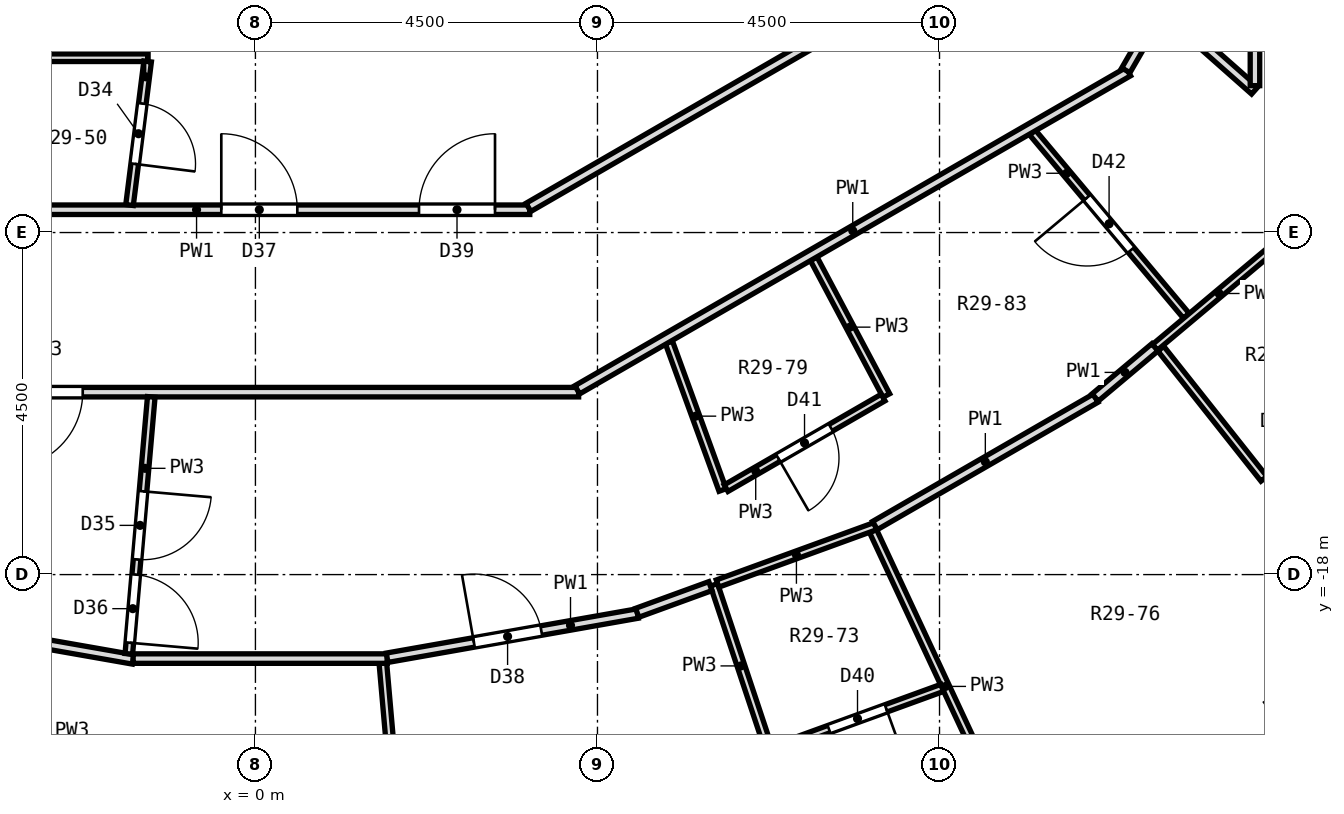
"""IFC4 building model, lengths in metres.
Left out: names, types, materials, properties, quantities, classifications, styles, units other than length and angle.
Written with IfcOpenShell. Run it as: python <this file> out.ifc"""

import sys

from ifc_helpers import new_model, si_unit, direction, frame, frame_2d, origin, place, context, subcontext, project, spatial, rectangle, extrude, element, fill, save


model = new_model("IFC4")
c1 = context("Model", 3, precision=1e-05, world=origin(), true_north=direction((0.0, 1.0)))
c2 = subcontext(c1, "Body", "Model", "MODEL_VIEW")
j1 = project(units=[si_unit("LENGTHUNIT", "METRE"), si_unit("PLANEANGLEUNIT", "RADIAN")], contexts=[c1])
p1 = place(None, origin())
s1 = spatial("IfcSite", under=j1, at=p1, CompositionType="ELEMENT")
p2 = place(p1, origin())
s2 = spatial("IfcBuilding", under=s1, at=p2, CompositionType="ELEMENT")
p3 = place(p2, frame((0.0, 0.0, 200.4)))
s3 = spatial("IfcBuildingStorey", under=s2, at=p3, CompositionType="ELEMENT", Elevation=200.4)
p4 = place(p3, frame((1.677, -19.167, 0.0), z_axis=(0.0, 0.0, 1.0), x_axis=(0.087521667832, -0.996162616072, 0.0)))
e1 = element("IfcWall", 1, at=p4, inside=s3, PredefinedType="PARTITIONING", context=c2, shape_type="SweptSolid", body=[
    extrude(rectangle(XDim=4.5, YDim=0.1, at=frame_2d((2.25, 0.0))), origin(), (0.0, 0.0, 1.0), 2.85),
])
p5 = place(p3, frame((6.033, -18.135, 0.0), z_axis=(0.0, 0.0, 1.0), x_axis=(0.316032342538, -0.948748416847, 0.0)))
e2 = element("IfcWall", 2, at=p5, inside=s3, PredefinedType="PARTITIONING", context=c2, shape_type="SweptSolid", body=[
    extrude(rectangle(XDim=2.249, YDim=0.1, at=frame_2d((1.125, 0.0))), origin(), (0.0, 0.0, 1.0), 2.85),
])
p6 = place(p3, frame((5.439, -14.944, 0.0), z_axis=(0.0, 0.0, 1.0), x_axis=(0.341828386263, -0.939762392493, 0.0)))
e3 = element("IfcWall", 3, at=p6, inside=s3, PredefinedType="PARTITIONING", context=c2, shape_type="SweptSolid", body=[
    extrude(rectangle(XDim=2.068, YDim=0.1, at=frame_2d((1.034, 0.0))), origin(), (0.0, 0.0, 1.0), 2.85),
])
p7 = place(p3, frame((8.125, -17.427, 0.0), z_axis=(0.0, 0.0, 1.0), x_axis=(0.422852881861, -0.906198344901, 0.0)))
e4 = element("IfcWall", 4, at=p7, inside=s3, PredefinedType="PARTITIONING", context=c2, shape_type="SweptSolid", body=[
    extrude(rectangle(XDim=4.512, YDim=0.1, at=frame_2d((2.256, 0.0))), origin(), (0.0, 0.0, 1.0), 2.85),
])
p8 = place(p3, frame((7.345, -13.845, 0.0), z_axis=(0.0, 0.0, 1.0), x_axis=(0.46899451783, -0.883201076905, 0.0)))
e5 = element("IfcWall", 5, at=p8, inside=s3, PredefinedType="PARTITIONING", context=c2, shape_type="SweptSolid", body=[
    extrude(rectangle(XDim=2.036, YDim=0.1, at=frame_2d((1.018, 0.0))), origin(), (0.0, 0.0, 1.0), 2.85),
])
p9 = place(p3, frame((11.912, -15.028, 0.0), z_axis=(0.0, 0.0, 1.0), x_axis=(0.621158069359, -0.783685302191, 0.0)))
e6 = element("IfcWall", 6, at=p9, inside=s3, PredefinedType="PARTITIONING", context=c2, shape_type="SweptSolid", body=[
    extrude(rectangle(XDim=2.184, YDim=0.1, at=frame_2d((1.092, 0.0))), origin(), (0.0, 0.0, 1.0), 2.85),
])
p10 = place(p3, frame((10.223, -12.184, 0.0), z_axis=(0.0, 0.0, 1.0), x_axis=(0.642811941649, -0.766024025519, 0.0)))
e7 = element("IfcWall", 7, at=p10, inside=s3, PredefinedType="PARTITIONING", context=c2, shape_type="SweptSolid", body=[
    extrude(rectangle(XDim=3.148, YDim=0.1, at=frame_2d((1.574, 0.0))), origin(), (0.0, 0.0, 1.0), 2.85),
])
p11 = place(p10, frame((1.118, 0.0, 0.0)))
e8 = element("IfcOpeningElement", 8, at=p11, cuts=e7, PredefinedType="OPENING", context=c2, shape_type="SweptSolid", body=[
    extrude(rectangle(XDim=0.9, YDim=2.1, at=frame_2d((0.45, 1.05))), frame((0.0, 0.062, 0.0), z_axis=(0.0, -1.0, 0.0), x_axis=(1.0, 0.0, 0.0)), (0.0, 0.0, 1.0), 0.124),
])
p12 = place(p3, frame((6.418, -5.682, 0.0), z_axis=(0.0, 0.0, 1.0), x_axis=(0.749233096006, -0.662306400278, 0.0)))
e9 = element("IfcWall", 9, at=p12, inside=s3, PredefinedType="PARTITIONING", context=c2, shape_type="SweptSolid", body=[
    extrude(rectangle(XDim=8.982, YDim=0.125, at=frame_2d((4.491, 0.0))), origin(), (0.0, 0.0, 1.0), 2.85),
])
p13 = place(p3, frame((-2.855, -18.897, 0.0), z_axis=(0.0, 0.0, 1.0), x_axis=(0.984944347712, -0.17287172097, 0.0)))
e10 = element("IfcWall", 10, at=p13, inside=s3, PredefinedType="PARTITIONING", context=c2, shape_type="SweptSolid", body=[
    extrude(rectangle(XDim=1.265, YDim=0.125, at=frame_2d((0.633, 0.0))), origin(), (0.0, 0.0, 1.0), 2.85),
])
p14 = place(p3, frame((-1.608, -19.105, 0.0), z_axis=(0.0, 0.0, 1.0), x_axis=(1.0, 0.0, 0.0)))
e11 = element("IfcWall", 11, at=p14, inside=s3, PredefinedType="PARTITIONING", context=c2, shape_type="SweptSolid", body=[
    extrude(rectangle(XDim=3.343, YDim=0.125, at=frame_2d((1.671, 0.0))), origin(), (0.0, 0.0, 1.0), 2.85),
])
p15 = place(p3, frame((-4.116, -15.6, 0.0), z_axis=(0.0, 0.0, 1.0), x_axis=(1.0, 0.0, 0.0)))
e12 = element("IfcWall", 12, at=p15, inside=s3, PredefinedType="PARTITIONING", context=c2, shape_type="SweptSolid", body=[
    extrude(rectangle(XDim=8.369, YDim=0.125, at=frame_2d((4.184, 0.0))), origin(), (0.0, 0.0, 1.0), 2.85),
])
p16 = place(p15, frame((0.844, 0.0, 0.0)))
e13 = element("IfcOpeningElement", 13, at=p16, cuts=e12, PredefinedType="OPENING", context=c2, shape_type="SweptSolid", body=[
    extrude(rectangle(XDim=1.0, YDim=2.1, at=frame_2d((0.5, 1.05))), frame((0.0, 0.074, 0.0), z_axis=(0.0, -1.0, 0.0), x_axis=(1.0, 0.0, 0.0)), (0.0, 0.0, 1.0), 0.149),
])
p17 = place(p3, frame((-3.475, -13.2, 0.0), z_axis=(0.0, 0.0, 1.0), x_axis=(1.0, 0.0, 0.0)))
e14 = element("IfcWall", 14, at=p17, inside=s3, PredefinedType="PARTITIONING", context=c2, shape_type="SweptSolid", body=[
    extrude(rectangle(XDim=7.084, YDim=0.125, at=frame_2d((3.542, 0.0))), origin(), (0.0, 0.0, 1.0), 2.85),
])
p18 = place(p17, frame((3.025, 0.0, 0.0)))
e15 = element("IfcOpeningElement", 15, at=p18, cuts=e14, PredefinedType="OPENING", context=c2, shape_type="SweptSolid", body=[
    extrude(rectangle(XDim=1.0, YDim=2.1, at=frame_2d((0.5, 1.05))), frame((0.0, 0.074, 0.0), z_axis=(0.0, -1.0, 0.0), x_axis=(1.0, 0.0, 0.0)), (0.0, 0.0, 1.0), 0.149),
])
p19 = place(p17, frame((5.626, 0.0, 0.0)))
e16 = element("IfcOpeningElement", 16, at=p19, cuts=e14, PredefinedType="OPENING", context=c2, shape_type="SweptSolid", body=[
    extrude(rectangle(XDim=1.0, YDim=2.1, at=frame_2d((0.5, 1.05))), frame((0.0, 0.074, 0.0), z_axis=(0.0, -1.0, 0.0), x_axis=(1.0, 0.0, 0.0)), (0.0, 0.0, 1.0), 0.149),
])
p20 = place(p3, frame((-2.926, -11.2, 0.0), z_axis=(0.0, 0.0, 1.0), x_axis=(1.0, 0.0, 0.0)))
e17 = element("IfcWall", 17, at=p20, inside=s3, PredefinedType="PARTITIONING", context=c2, shape_type="SweptSolid", body=[
    extrude(rectangle(XDim=1.514, YDim=0.1, at=frame_2d((0.757, 0.0))), origin(), (0.0, 0.0, 1.0), 2.85),
])
p21 = place(p3, frame((1.732, -19.094, 0.0), z_axis=(0.0, 0.0, 1.0), x_axis=(0.984782824009, 0.173789497774, 0.0)))
e18 = element("IfcWall", 18, at=p21, inside=s3, PredefinedType="PARTITIONING", context=c2, shape_type="SweptSolid", body=[
    extrude(rectangle(XDim=3.345, YDim=0.125, at=frame_2d((1.672, 0.0))), origin(), (0.0, 0.0, 1.0), 2.85),
])
p22 = place(p21, frame((1.159, 0.0, 0.0)))
e19 = element("IfcOpeningElement", 19, at=p22, cuts=e18, PredefinedType="OPENING", context=c2, shape_type="SweptSolid", body=[
    extrude(rectangle(XDim=0.9, YDim=2.1, at=frame_2d((0.45, 1.05))), frame((0.0, 0.074, 0.0), z_axis=(0.0, -1.0, 0.0), x_axis=(1.0, 0.0, 0.0)), (0.0, 0.0, 1.0), 0.149),
])
p23 = place(p3, frame((6.807, -20.301, 0.0), z_axis=(0.0, 0.0, 1.0), x_axis=(0.939763340539, 0.341825779863, 0.0)))
e20 = element("IfcWall", 20, at=p23, inside=s3, PredefinedType="PARTITIONING", context=c2, shape_type="SweptSolid", body=[
    extrude(rectangle(XDim=2.37, YDim=0.1, at=frame_2d((1.185, 0.0))), origin(), (0.0, 0.0, 1.0), 2.85),
])
p24 = place(p23, frame((0.785, 0.0, 0.0)))
e21 = element("IfcOpeningElement", 21, at=p24, cuts=e20, PredefinedType="OPENING", context=c2, shape_type="SweptSolid", body=[
    extrude(rectangle(XDim=0.8, YDim=2.1, at=frame_2d((0.4, 1.05))), frame((0.0, 0.062, 0.0), z_axis=(0.0, -1.0, 0.0), x_axis=(1.0, 0.0, 0.0)), (0.0, 0.0, 1.0), 0.124),
])
p25 = place(p3, frame((6.08, -18.118, 0.0), z_axis=(0.0, 0.0, 1.0), x_axis=(0.939706230865, 0.341982747625, 0.0)))
e22 = element("IfcWall", 22, at=p25, inside=s3, PredefinedType="PARTITIONING", context=c2, shape_type="SweptSolid", body=[
    extrude(rectangle(XDim=2.208, YDim=0.1, at=frame_2d((1.104, 0.0))), origin(), (0.0, 0.0, 1.0), 2.85),
])
p26 = place(p3, frame((5.023, -18.503, 0.0), z_axis=(0.0, 0.0, 1.0), x_axis=(0.939605522223, 0.34225934992, 0.0)))
e23 = element("IfcWall", 23, at=p26, inside=s3, PredefinedType="PARTITIONING", context=c2, shape_type="SweptSolid", body=[
    extrude(rectangle(XDim=1.025, YDim=0.125, at=frame_2d((0.513, 0.0))), origin(), (0.0, 0.0, 1.0), 2.85),
])
p27 = place(p3, frame((8.15, -17.355, 0.0), z_axis=(0.0, 0.0, 1.0), x_axis=(0.86608012654, 0.499905205426, 0.0)))
e24 = element("IfcWall", 24, at=p27, inside=s3, PredefinedType="PARTITIONING", context=c2, shape_type="SweptSolid", body=[
    extrude(rectangle(XDim=3.354, YDim=0.125, at=frame_2d((1.677, 0.0))), origin(), (0.0, 0.0, 1.0), 2.85),
])
p28 = place(p3, frame((6.192, -16.863, 0.0), z_axis=(0.0, 0.0, 1.0), x_axis=(0.866112296403, 0.49984946736, 0.0)))
e25 = element("IfcWall", 25, at=p28, inside=s3, PredefinedType="PARTITIONING", context=c2, shape_type="SweptSolid", body=[
    extrude(rectangle(XDim=2.385, YDim=0.1, at=frame_2d((1.192, 0.0))), origin(), (0.0, 0.0, 1.0), 2.85),
])
p29 = place(p28, frame((0.792, 0.0, 0.0)))
e26 = element("IfcOpeningElement", 26, at=p29, cuts=e25, PredefinedType="OPENING", context=c2, shape_type="SweptSolid", body=[
    extrude(rectangle(XDim=0.8, YDim=2.1, at=frame_2d((0.4, 1.05))), frame((0.0, 0.062, 0.0), z_axis=(0.0, -1.0, 0.0), x_axis=(1.0, 0.0, 0.0)), (0.0, 0.0, 1.0), 0.124),
])
p30 = place(p3, frame((4.234, -15.569, 0.0), z_axis=(0.0, 0.0, 1.0), x_axis=(0.866024799292, 0.50000104701, 0.0)))
e27 = element("IfcWall", 27, at=p30, inside=s3, PredefinedType="PARTITIONING", context=c2, shape_type="SweptSolid", body=[
    extrude(rectangle(XDim=8.37, YDim=0.125, at=frame_2d((4.185, 0.0))), origin(), (0.0, 0.0, 1.0), 2.85),
])
p31 = place(p3, frame((3.591, -13.169, 0.0), z_axis=(0.0, 0.0, 1.0), x_axis=(0.866023753919, 0.50000285764, 0.0)))
e28 = element("IfcWall", 28, at=p31, inside=s3, PredefinedType="PARTITIONING", context=c2, shape_type="SweptSolid", body=[
    extrude(rectangle(XDim=6.959, YDim=0.125, at=frame_2d((3.479, 0.0))), origin(), (0.0, 0.0, 1.0), 2.85),
])
p32 = place(p3, frame((11.834, -15.01, 0.0), z_axis=(0.0, 0.0, 1.0), x_axis=(0.766038513467, 0.642794676305, 0.0)))
e29 = element("IfcWall", 29, at=p32, inside=s3, PredefinedType="PARTITIONING", context=c2, shape_type="SweptSolid", body=[
    extrude(rectangle(XDim=2.205, YDim=0.1, at=frame_2d((1.103, 0.0))), origin(), (0.0, 0.0, 1.0), 2.85),
])
p33 = place(p3, frame((11.048, -15.67, 0.0), z_axis=(0.0, 0.0, 1.0), x_axis=(0.765934498954, 0.642918613288, 0.0)))
e30 = element("IfcWall", 30, at=p33, inside=s3, PredefinedType="PARTITIONING", context=c2, shape_type="SweptSolid", body=[
    extrude(rectangle(XDim=1.026, YDim=0.125, at=frame_2d((0.513, 0.0))), origin(), (0.0, 0.0, 1.0), 2.85),
])
p34 = place(p3, frame((11.451, -11.366, 0.0), z_axis=(0.0, 0.0, 1.0), x_axis=(0.500018690203, 0.866014612722, 0.0)))
e31 = element("IfcWall", 31, at=p34, inside=s3, PredefinedType="PARTITIONING", context=c2, shape_type="SweptSolid", body=[
    extrude(rectangle(XDim=0.88, YDim=0.125, at=frame_2d((0.44, 0.0))), origin(), (0.0, 0.0, 1.0), 2.85),
])
p35 = place(p3, frame((-3.521, -13.14, 0.0), z_axis=(0.0, 0.0, 1.0), x_axis=(0.258863724951, 0.965913853252, 0.0)))
e32 = element("IfcWall", 32, at=p35, inside=s3, PredefinedType="PARTITIONING", context=c2, shape_type="SweptSolid", body=[
    extrude(rectangle(XDim=4.111, YDim=0.15, at=frame_2d((2.056, 0.0))), origin(), (0.0, 0.0, 1.0), 2.85),
])
p36 = place(p3, frame((-1.656, -13.138, 0.0), z_axis=(0.0, 0.0, 1.0), x_axis=(0.125060808232, 0.992149078639, 0.0)))
e33 = element("IfcWall", 33, at=p36, inside=s3, PredefinedType="PARTITIONING", context=c2, shape_type="SweptSolid", body=[
    extrude(rectangle(XDim=1.903, YDim=0.1, at=frame_2d((0.952, 0.0))), origin(), (0.0, 0.0, 1.0), 2.85),
])
p37 = place(p36, frame((0.545, 0.0, 0.0)))
e34 = element("IfcOpeningElement", 34, at=p37, cuts=e33, PredefinedType="OPENING", context=c2, shape_type="SweptSolid", body=[
    extrude(rectangle(XDim=0.8, YDim=2.1, at=frame_2d((0.4, 1.05))), frame((0.0, 0.062, 0.0), z_axis=(0.0, -1.0, 0.0), x_axis=(1.0, 0.0, 0.0)), (0.0, 0.0, 1.0), 0.124),
])
p38 = place(p3, frame((-1.666, -19.043, 0.0), z_axis=(0.0, 0.0, 1.0), x_axis=(0.086986657325, 0.99620947669, 0.0)))
e35 = element("IfcWall", 35, at=p38, inside=s3, PredefinedType="PARTITIONING", context=c2, shape_type="SweptSolid", body=[
    extrude(rectangle(XDim=3.393, YDim=0.1, at=frame_2d((1.697, 0.0))), origin(), (0.0, 0.0, 1.0), 2.85),
])
p39 = place(p38, frame((1.247, 0.0, 0.0)))
e36 = element("IfcOpeningElement", 36, at=p39, cuts=e35, PredefinedType="OPENING", context=c2, shape_type="SweptSolid", body=[
    extrude(rectangle(XDim=0.9, YDim=2.1, at=frame_2d((0.45, 1.05))), frame((0.0, 0.062, 0.0), z_axis=(0.0, -1.0, 0.0), x_axis=(1.0, 0.0, 0.0)), (0.0, 0.0, 1.0), 0.124),
])
p40 = place(p38, frame((0.147, 0.0, 0.0)))
e37 = element("IfcOpeningElement", 37, at=p40, cuts=e35, PredefinedType="OPENING", context=c2, shape_type="SweptSolid", body=[
    extrude(rectangle(XDim=0.9, YDim=2.1, at=frame_2d((0.45, 1.05))), frame((0.0, 0.062, 0.0), z_axis=(0.0, -1.0, 0.0), x_axis=(1.0, 0.0, 0.0)), (0.0, 0.0, 1.0), 0.124),
])
p41 = place(p3, frame((13.15, -11.567, 0.0), z_axis=(0.0, 0.0, 1.0), x_axis=(0.0, 1.0, 0.0)))
e38 = element("IfcWall", 38, at=p41, inside=s3, PredefinedType="PARTITIONING", context=c2, shape_type="SweptSolid", body=[
    extrude(rectangle(XDim=2.216, YDim=0.125, at=frame_2d((1.108, 0.0))), origin(), (0.0, 0.0, 1.0), 2.85),
])
p42 = place(p41, frame((1.127, 0.0, 0.0)))
e39 = element("IfcOpeningElement", 39, at=p42, cuts=e38, PredefinedType="OPENING", context=c2, shape_type="SweptSolid", body=[
    extrude(rectangle(XDim=0.9, YDim=2.1, at=frame_2d((0.45, 1.05))), frame((0.0, 0.074, 0.0), z_axis=(0.0, -1.0, 0.0), x_axis=(1.0, 0.0, 0.0)), (0.0, 0.0, 1.0), 0.149),
])
p43 = place(p16, frame((1.0, 0.0, 0.0), z_axis=(0.0, 0.0, 1.0), x_axis=(-1.0, 0.0, 0.0)))
e40 = element("IfcDoor", 40, at=p43, inside=s3, OperationType="SINGLE_SWING_RIGHT", PredefinedType="DOOR", context=c2, shape_type="SweptSolid", body=[
    extrude(rectangle(XDim=1.0, YDim=2.1, at=frame_2d((0.5, 1.05))), frame((0.0, 0.025, 0.0), z_axis=(0.0, -1.0, 0.0), x_axis=(1.0, 0.0, 0.0)), (0.0, 0.0, 1.0), 0.05),
])
fill(e13, e40)
p44 = place(p37, frame((0.8, 0.0, 0.0), z_axis=(0.0, 0.0, 1.0), x_axis=(-1.0, 0.0, 0.0)))
e41 = element("IfcDoor", 41, at=p44, inside=s3, OperationType="SINGLE_SWING_RIGHT", PredefinedType="DOOR", context=c2, shape_type="SweptSolid", body=[
    extrude(rectangle(XDim=0.8, YDim=2.1, at=frame_2d((0.4, 1.05))), frame((0.0, 0.025, 0.0), z_axis=(0.0, -1.0, 0.0), x_axis=(1.0, 0.0, 0.0)), (0.0, 0.0, 1.0), 0.05),
])
fill(e34, e41)
p45 = place(p39, frame((0.9, 0.0, 0.0), z_axis=(0.0, 0.0, 1.0), x_axis=(-1.0, 0.0, 0.0)))
e42 = element("IfcDoor", 42, at=p45, inside=s3, OperationType="SINGLE_SWING_LEFT", PredefinedType="DOOR", context=c2, shape_type="SweptSolid", body=[
    extrude(rectangle(XDim=0.9, YDim=2.1, at=frame_2d((0.45, 1.05))), frame((0.0, 0.025, 0.0), z_axis=(0.0, -1.0, 0.0), x_axis=(1.0, 0.0, 0.0)), (0.0, 0.0, 1.0), 0.05),
])
fill(e36, e42)
p46 = place(p40, frame((0.9, 0.0, 0.0), z_axis=(0.0, 0.0, 1.0), x_axis=(-1.0, 0.0, 0.0)))
e43 = element("IfcDoor", 43, at=p46, inside=s3, OperationType="SINGLE_SWING_RIGHT", PredefinedType="DOOR", context=c2, shape_type="SweptSolid", body=[
    extrude(rectangle(XDim=0.9, YDim=2.1, at=frame_2d((0.45, 1.05))), frame((0.0, 0.025, 0.0), z_axis=(0.0, -1.0, 0.0), x_axis=(1.0, 0.0, 0.0)), (0.0, 0.0, 1.0), 0.05),
])
fill(e37, e43)
p47 = place(p18, origin())
e44 = element("IfcDoor", 44, at=p47, inside=s3, OperationType="SINGLE_SWING_LEFT", PredefinedType="DOOR", context=c2, shape_type="SweptSolid", body=[
    extrude(rectangle(XDim=1.0, YDim=2.1, at=frame_2d((0.5, 1.05))), frame((0.0, 0.025, 0.0), z_axis=(0.0, -1.0, 0.0), x_axis=(1.0, 0.0, 0.0)), (0.0, 0.0, 1.0), 0.05),
])
fill(e15, e44)
p48 = place(p22, origin())
e45 = element("IfcDoor", 45, at=p48, inside=s3, OperationType="SINGLE_SWING_LEFT", PredefinedType="DOOR", context=c2, shape_type="SweptSolid", body=[
    extrude(rectangle(XDim=0.9, YDim=2.1, at=frame_2d((0.45, 1.05))), frame((0.0, 0.025, 0.0), z_axis=(0.0, -1.0, 0.0), x_axis=(1.0, 0.0, 0.0)), (0.0, 0.0, 1.0), 0.05),
])
fill(e19, e45)
p49 = place(p19, origin())
e46 = element("IfcDoor", 46, at=p49, inside=s3, OperationType="SINGLE_SWING_RIGHT", PredefinedType="DOOR", context=c2, shape_type="SweptSolid", body=[
    extrude(rectangle(XDim=1.0, YDim=2.1, at=frame_2d((0.5, 1.05))), frame((0.0, 0.025, 0.0), z_axis=(0.0, -1.0, 0.0), x_axis=(1.0, 0.0, 0.0)), (0.0, 0.0, 1.0), 0.05),
])
fill(e16, e46)
p50 = place(p24, frame((0.8, 0.0, 0.0), z_axis=(0.0, 0.0, 1.0), x_axis=(-1.0, 0.0, 0.0)))
e47 = element("IfcDoor", 47, at=p50, inside=s3, OperationType="SINGLE_SWING_LEFT", PredefinedType="DOOR", context=c2, shape_type="SweptSolid", body=[
    extrude(rectangle(XDim=0.8, YDim=2.1, at=frame_2d((0.4, 1.05))), frame((0.0, 0.025, 0.0), z_axis=(0.0, -1.0, 0.0), x_axis=(1.0, 0.0, 0.0)), (0.0, 0.0, 1.0), 0.05),
])
fill(e21, e47)
p51 = place(p29, frame((0.8, 0.0, 0.0), z_axis=(0.0, 0.0, 1.0), x_axis=(-1.0, 0.0, 0.0)))
e48 = element("IfcDoor", 48, at=p51, inside=s3, OperationType="SINGLE_SWING_RIGHT", PredefinedType="DOOR", context=c2, shape_type="SweptSolid", body=[
    extrude(rectangle(XDim=0.8, YDim=2.1, at=frame_2d((0.4, 1.05))), frame((0.0, 0.025, 0.0), z_axis=(0.0, -1.0, 0.0), x_axis=(1.0, 0.0, 0.0)), (0.0, 0.0, 1.0), 0.05),
])
fill(e26, e48)
p52 = place(p11, frame((0.9, 0.0, 0.0), z_axis=(0.0, 0.0, 1.0), x_axis=(-1.0, 0.0, 0.0)))
e49 = element("IfcDoor", 49, at=p52, inside=s3, OperationType="SINGLE_SWING_RIGHT", PredefinedType="DOOR", context=c2, shape_type="SweptSolid", body=[
    extrude(rectangle(XDim=0.9, YDim=2.1, at=frame_2d((0.45, 1.05))), frame((0.0, 0.025, 0.0), z_axis=(0.0, -1.0, 0.0), x_axis=(1.0, 0.0, 0.0)), (0.0, 0.0, 1.0), 0.05),
])
fill(e8, e49)
save(model, sys.argv[1])
